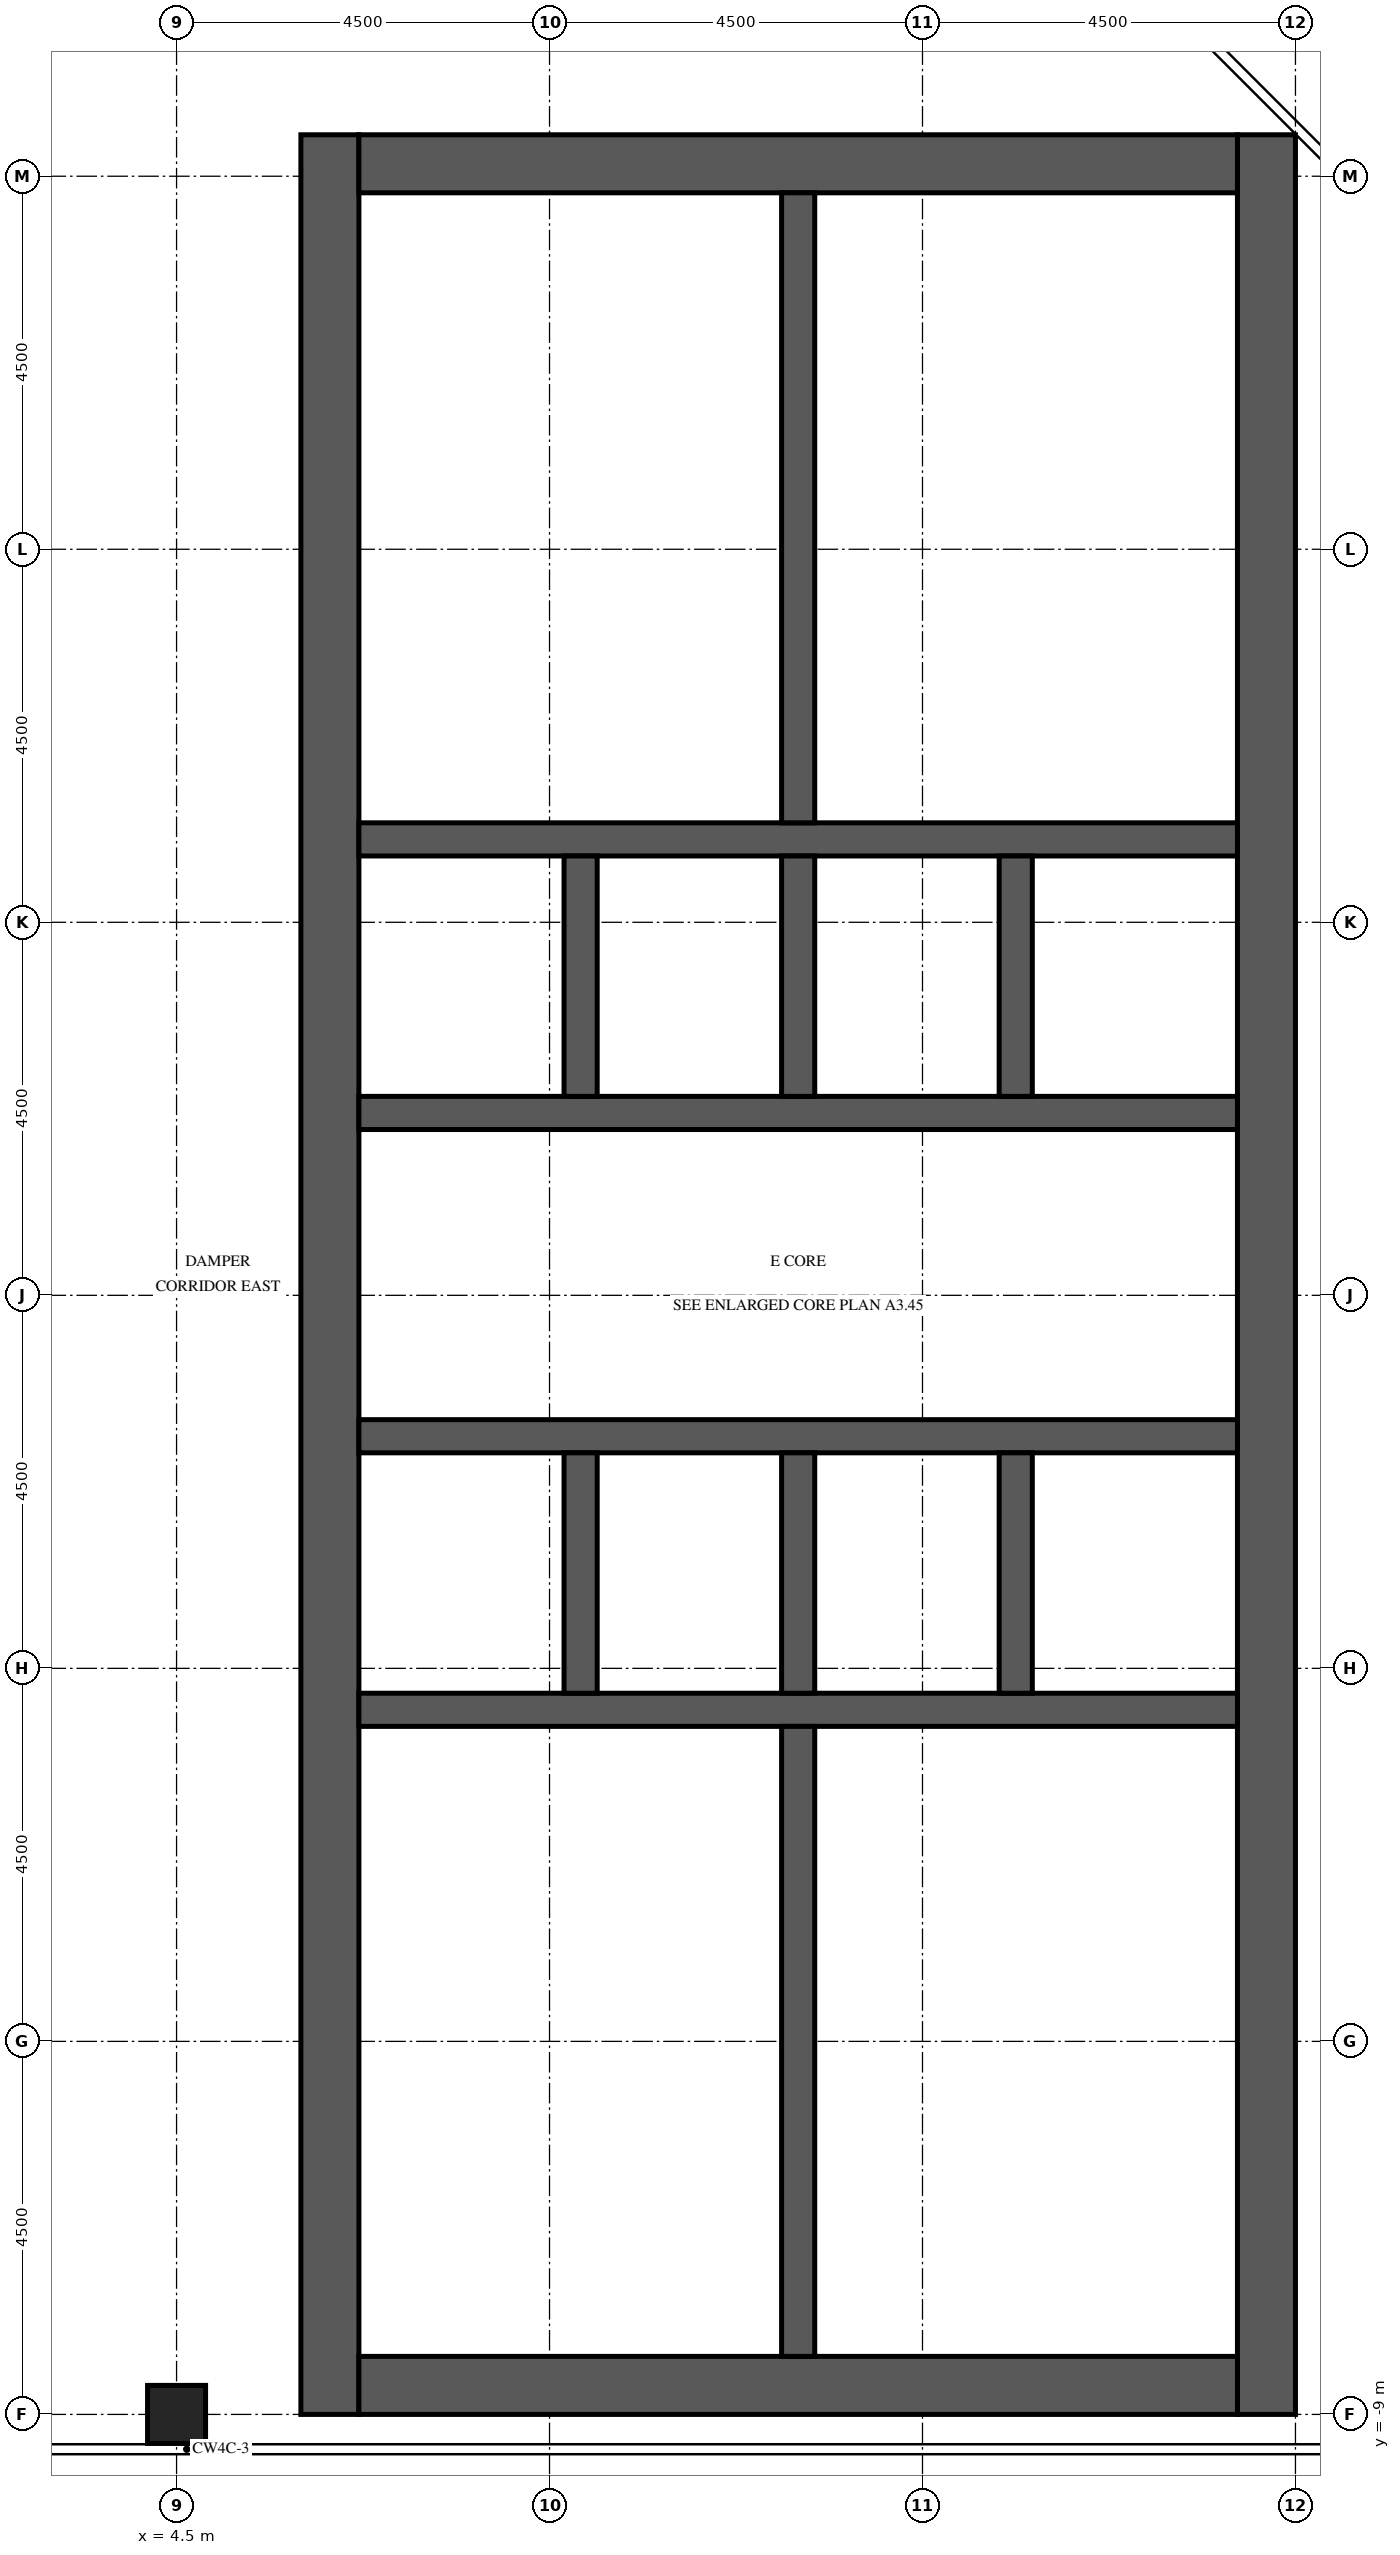
"""IFC4 building model, lengths in metres.
Left out: names, types, materials, properties, quantities, classifications, styles, units other than length and angle.
Written with IfcOpenShell. Run it as: python <this file> out.ifc"""

import sys

from ifc_helpers import new_model, si_unit, direction, frame, frame_2d, origin, origin_2d, place, context, subcontext, project, spatial, rectangle, extrude, element, fill, save


model = new_model("IFC4")
c1 = context("Model", 3, precision=1e-05, world=origin(), true_north=direction((0.0, 1.0)))
c2 = subcontext(c1, "Body", "Model", "MODEL_VIEW")
j1 = project(units=[si_unit("LENGTHUNIT", "METRE"), si_unit("PLANEANGLEUNIT", "RADIAN")], contexts=[c1])
p1 = place(None, origin())
s1 = spatial("IfcSite", under=j1, at=p1, CompositionType="ELEMENT")
p2 = place(p1, origin())
s2 = spatial("IfcBuilding", under=s1, at=p2, CompositionType="ELEMENT")
p3 = place(p2, frame((0.0, 0.0, 311.8)))
s3 = spatial("IfcBuildingStorey", under=s2, at=p3, CompositionType="ELEMENT", Elevation=311.8)
p4 = place(p3, frame((4.5, -9.0, -0.6), z_axis=(0.0, 0.0, 1.0), x_axis=(1.0, 0.0, 0.0)))
e1 = element("IfcColumn", 1, at=p4, inside=s3, PredefinedType="COLUMN", context=c2, shape_type="SweptSolid", body=[
    extrude(rectangle(XDim=0.7, YDim=0.7, at=origin_2d()), origin(), (0.0, 0.0, 1.0), 5.4),
])
p5 = place(p3, frame((6.35, -9.0, 0.0), z_axis=(0.0, 0.0, 1.0), x_axis=(0.0, 1.0, 0.0)))
e2 = element("IfcWall", 2, at=p5, inside=s3, PredefinedType="SHEAR", context=c2, shape_type="SweptSolid", body=[
    extrude(rectangle(XDim=27.5, YDim=0.7, at=frame_2d((13.75, 0.0))), origin(), (0.0, 0.0, 1.0), 4.8),
])
p6 = place(p5, frame((12.55, 0.0, 0.0)))
e3 = element("IfcOpeningElement", 3, at=p6, cuts=e2, PredefinedType="OPENING", context=c2, shape_type="SweptSolid", body=[
    extrude(rectangle(XDim=2.4, YDim=2.4, at=frame_2d((1.2, 1.2))), frame((0.0, 0.36, 0.0), z_axis=(0.0, -1.0, 0.0), x_axis=(1.0, 0.0, 0.0)), (0.0, 0.0, 1.0), 0.72),
])
p7 = place(p5, frame((3.9, 0.0, 0.0)))
e4 = element("IfcOpeningElement", 4, at=p7, cuts=e2, PredefinedType="OPENING", context=c2, shape_type="SweptSolid", body=[
    extrude(rectangle(XDim=1.2, YDim=2.1, at=frame_2d((0.6, 1.05))), frame((0.0, 0.36, 0.0), z_axis=(0.0, -1.0, 0.0), x_axis=(1.0, 0.0, 0.0)), (0.0, 0.0, 1.0), 0.72),
])
p8 = place(p5, frame((22.4, 0.0, 0.0)))
e5 = element("IfcOpeningElement", 5, at=p8, cuts=e2, PredefinedType="OPENING", context=c2, shape_type="SweptSolid", body=[
    extrude(rectangle(XDim=1.2, YDim=2.1, at=frame_2d((0.6, 1.05))), frame((0.0, 0.36, 0.0), z_axis=(0.0, -1.0, 0.0), x_axis=(1.0, 0.0, 0.0)), (0.0, 0.0, 1.0), 0.72),
])
p9 = place(p3, frame((17.65, -9.0, 0.0), z_axis=(0.0, 0.0, 1.0), x_axis=(0.0, 1.0, 0.0)))
e6 = element("IfcWall", 6, at=p9, inside=s3, PredefinedType="SHEAR", context=c2, shape_type="SweptSolid", body=[
    extrude(rectangle(XDim=27.5, YDim=0.7, at=frame_2d((13.75, 0.0))), origin(), (0.0, 0.0, 1.0), 4.8),
])
for number, where, z_axis, x_axis in (
    (7, (6.7, -8.65, 0.0), (0.0, 0.0, 1.0), (1.0, 0.0, 0.0)),
    (8, (6.7, 18.15, 0.0), (0.0, 0.0, 1.0), (1.0, 0.0, 0.0)),
):
    element("IfcWall", number, at=place(p3, frame(where, z_axis=z_axis, x_axis=x_axis)), inside=s3, PredefinedType="SHEAR", context=c2, shape_type="SweptSolid", body=[
        extrude(rectangle(XDim=10.6, YDim=0.7, at=frame_2d((5.3, 0.0))), origin(), (0.0, 0.0, 1.0), 4.8),
    ])
p10 = place(p3, frame((6.7, -0.5, 0.0), z_axis=(0.0, 0.0, 1.0), x_axis=(1.0, 0.0, 0.0)))
e9 = element("IfcWall", 9, at=p10, inside=s3, PredefinedType="SHEAR", context=c2, shape_type="SweptSolid", body=[
    extrude(rectangle(XDim=10.6, YDim=0.4, at=frame_2d((5.3, 0.0))), origin(), (0.0, 0.0, 1.0), 4.8),
])
p11 = place(p3, frame((6.7, 2.8, 0.0), z_axis=(0.0, 0.0, 1.0), x_axis=(1.0, 0.0, 0.0)))
e10 = element("IfcWall", 10, at=p11, inside=s3, PredefinedType="SHEAR", context=c2, shape_type="SweptSolid", body=[
    extrude(rectangle(XDim=10.6, YDim=0.4, at=frame_2d((5.3, 0.0))), origin(), (0.0, 0.0, 1.0), 4.8),
])
p12 = place(p11, frame((0.688, 0.0, 0.0)))
e11 = element("IfcOpeningElement", 11, at=p12, cuts=e10, PredefinedType="OPENING", context=c2, shape_type="SweptSolid", body=[
    extrude(rectangle(XDim=1.1, YDim=2.1, at=frame_2d((0.55, 1.05))), frame((0.0, 0.21, 0.0), z_axis=(0.0, -1.0, 0.0), x_axis=(1.0, 0.0, 0.0)), (0.0, 0.0, 1.0), 0.42),
])
p13 = place(p11, frame((3.438, 0.0, 0.0)))
e12 = element("IfcOpeningElement", 12, at=p13, cuts=e10, PredefinedType="OPENING", context=c2, shape_type="SweptSolid", body=[
    extrude(rectangle(XDim=1.1, YDim=2.1, at=frame_2d((0.55, 1.05))), frame((0.0, 0.21, 0.0), z_axis=(0.0, -1.0, 0.0), x_axis=(1.0, 0.0, 0.0)), (0.0, 0.0, 1.0), 0.42),
])
p14 = place(p11, frame((6.113, 0.0, 0.0)))
e13 = element("IfcOpeningElement", 13, at=p14, cuts=e10, PredefinedType="OPENING", context=c2, shape_type="SweptSolid", body=[
    extrude(rectangle(XDim=1.0, YDim=2.1, at=frame_2d((0.5, 1.05))), frame((0.0, 0.21, 0.0), z_axis=(0.0, -1.0, 0.0), x_axis=(1.0, 0.0, 0.0)), (0.0, 0.0, 1.0), 0.42),
])
p15 = place(p11, frame((8.863, 0.0, 0.0)))
e14 = element("IfcOpeningElement", 14, at=p15, cuts=e10, PredefinedType="OPENING", context=c2, shape_type="SweptSolid", body=[
    extrude(rectangle(XDim=1.0, YDim=2.1, at=frame_2d((0.5, 1.05))), frame((0.0, 0.21, 0.0), z_axis=(0.0, -1.0, 0.0), x_axis=(1.0, 0.0, 0.0)), (0.0, 0.0, 1.0), 0.42),
])
p16 = place(p3, frame((6.7, 6.7, 0.0), z_axis=(0.0, 0.0, 1.0), x_axis=(1.0, 0.0, 0.0)))
e15 = element("IfcWall", 15, at=p16, inside=s3, PredefinedType="SHEAR", context=c2, shape_type="SweptSolid", body=[
    extrude(rectangle(XDim=10.6, YDim=0.4, at=frame_2d((5.3, 0.0))), origin(), (0.0, 0.0, 1.0), 4.8),
])
p17 = place(p16, frame((0.738, 0.0, 0.0)))
e16 = element("IfcOpeningElement", 16, at=p17, cuts=e15, PredefinedType="OPENING", context=c2, shape_type="SweptSolid", body=[
    extrude(rectangle(XDim=1.0, YDim=2.1, at=frame_2d((0.5, 1.05))), frame((0.0, 0.21, 0.0), z_axis=(0.0, -1.0, 0.0), x_axis=(1.0, 0.0, 0.0)), (0.0, 0.0, 1.0), 0.42),
])
p18 = place(p16, frame((3.488, 0.0, 0.0)))
e17 = element("IfcOpeningElement", 17, at=p18, cuts=e15, PredefinedType="OPENING", context=c2, shape_type="SweptSolid", body=[
    extrude(rectangle(XDim=1.0, YDim=2.1, at=frame_2d((0.5, 1.05))), frame((0.0, 0.21, 0.0), z_axis=(0.0, -1.0, 0.0), x_axis=(1.0, 0.0, 0.0)), (0.0, 0.0, 1.0), 0.42),
])
p19 = place(p16, frame((6.113, 0.0, 0.0)))
e18 = element("IfcOpeningElement", 18, at=p19, cuts=e15, PredefinedType="OPENING", context=c2, shape_type="SweptSolid", body=[
    extrude(rectangle(XDim=1.0, YDim=2.1, at=frame_2d((0.5, 1.05))), frame((0.0, 0.21, 0.0), z_axis=(0.0, -1.0, 0.0), x_axis=(1.0, 0.0, 0.0)), (0.0, 0.0, 1.0), 0.42),
])
p20 = place(p16, frame((8.863, 0.0, 0.0)))
e19 = element("IfcOpeningElement", 19, at=p20, cuts=e15, PredefinedType="OPENING", context=c2, shape_type="SweptSolid", body=[
    extrude(rectangle(XDim=1.0, YDim=2.1, at=frame_2d((0.5, 1.05))), frame((0.0, 0.21, 0.0), z_axis=(0.0, -1.0, 0.0), x_axis=(1.0, 0.0, 0.0)), (0.0, 0.0, 1.0), 0.42),
])
p21 = place(p3, frame((6.7, 10.0, 0.0), z_axis=(0.0, 0.0, 1.0), x_axis=(1.0, 0.0, 0.0)))
e20 = element("IfcWall", 20, at=p21, inside=s3, PredefinedType="SHEAR", context=c2, shape_type="SweptSolid", body=[
    extrude(rectangle(XDim=10.6, YDim=0.4, at=frame_2d((5.3, 0.0))), origin(), (0.0, 0.0, 1.0), 4.8),
])
for number, where, z_axis, x_axis in (
    (21, (9.375, -0.3, 0.0), (0.0, 0.0, 1.0), (0.0, 1.0, 0.0)),
    (22, (9.375, 6.9, 0.0), (0.0, 0.0, 1.0), (0.0, 1.0, 0.0)),
    (23, (12.0, -0.3, 0.0), (0.0, 0.0, 1.0), (0.0, 1.0, 0.0)),
    (24, (12.0, 6.9, 0.0), (0.0, 0.0, 1.0), (0.0, 1.0, 0.0)),
    (25, (14.625, -0.3, 0.0), (0.0, 0.0, 1.0), (0.0, 1.0, 0.0)),
    (26, (14.625, 6.9, 0.0), (0.0, 0.0, 1.0), (0.0, 1.0, 0.0)),
):
    element("IfcWall", number, at=place(p3, frame(where, z_axis=z_axis, x_axis=x_axis)), inside=s3, PredefinedType="SHEAR", context=c2, shape_type="SweptSolid", body=[
        extrude(rectangle(XDim=2.9, YDim=0.4, at=frame_2d((1.45, 0.0))), origin(), (0.0, 0.0, 1.0), 4.8),
    ])
p22 = place(p3, frame((12.0, -8.3, 0.0), z_axis=(0.0, 0.0, 1.0), x_axis=(0.0, 1.0, 0.0)))
e27 = element("IfcWall", 27, at=p22, inside=s3, PredefinedType="SHEAR", context=c2, shape_type="SweptSolid", body=[
    extrude(rectangle(XDim=7.6, YDim=0.4, at=frame_2d((3.8, 0.0))), origin(), (0.0, 0.0, 1.0), 4.8),
])
p23 = place(p22, frame((6.125, 0.0, 0.0)))
e28 = element("IfcOpeningElement", 28, at=p23, cuts=e27, PredefinedType="OPENING", context=c2, shape_type="SweptSolid", body=[
    extrude(rectangle(XDim=1.2, YDim=2.1, at=frame_2d((0.6, 1.05))), frame((0.0, 0.21, 0.0), z_axis=(0.0, -1.0, 0.0), x_axis=(1.0, 0.0, 0.0)), (0.0, 0.0, 1.0), 0.42),
])
p24 = place(p3, frame((12.0, 10.2, 0.0), z_axis=(0.0, 0.0, 1.0), x_axis=(0.0, 1.0, 0.0)))
e29 = element("IfcWall", 29, at=p24, inside=s3, PredefinedType="SHEAR", context=c2, shape_type="SweptSolid", body=[
    extrude(rectangle(XDim=7.6, YDim=0.4, at=frame_2d((3.8, 0.0))), origin(), (0.0, 0.0, 1.0), 4.8),
])
p25 = place(p24, frame((0.275, 0.0, 0.0)))
e30 = element("IfcOpeningElement", 30, at=p25, cuts=e29, PredefinedType="OPENING", context=c2, shape_type="SweptSolid", body=[
    extrude(rectangle(XDim=1.2, YDim=2.1, at=frame_2d((0.6, 1.05))), frame((0.0, 0.21, 0.0), z_axis=(0.0, -1.0, 0.0), x_axis=(1.0, 0.0, 0.0)), (0.0, 0.0, 1.0), 0.42),
])
p26 = place(p12, origin())
e31 = element("IfcDoor", 31, at=p26, inside=s3, OperationType="DOUBLE_DOOR_SLIDING", PredefinedType="DOOR", context=c2, shape_type="SweptSolid", body=[
    extrude(rectangle(XDim=1.1, YDim=2.1, at=frame_2d((0.55, 1.05))), frame((0.0, 0.025, 0.0), z_axis=(0.0, -1.0, 0.0), x_axis=(1.0, 0.0, 0.0)), (0.0, 0.0, 1.0), 0.05),
])
fill(e11, e31)
p27 = place(p13, origin())
e32 = element("IfcDoor", 32, at=p27, inside=s3, OperationType="DOUBLE_DOOR_SLIDING", PredefinedType="DOOR", context=c2, shape_type="SweptSolid", body=[
    extrude(rectangle(XDim=1.1, YDim=2.1, at=frame_2d((0.55, 1.05))), frame((0.0, 0.025, 0.0), z_axis=(0.0, -1.0, 0.0), x_axis=(1.0, 0.0, 0.0)), (0.0, 0.0, 1.0), 0.05),
])
fill(e12, e32)
p28 = place(p6, origin())
e33 = element("IfcDoor", 33, at=p28, inside=s3, OperationType="DOUBLE_DOOR_DOUBLE_SWING", PredefinedType="DOOR", context=c2, shape_type="SweptSolid", body=[
    extrude(rectangle(XDim=2.4, YDim=2.4, at=frame_2d((1.2, 1.2))), frame((0.0, 0.025, 0.0), z_axis=(0.0, -1.0, 0.0), x_axis=(1.0, 0.0, 0.0)), (0.0, 0.0, 1.0), 0.05),
])
fill(e3, e33)
p29 = place(p23, origin())
e34 = element("IfcDoor", 34, at=p29, inside=s3, OperationType="SINGLE_SWING_RIGHT", PredefinedType="DOOR", context=c2, shape_type="SweptSolid", body=[
    extrude(rectangle(XDim=1.2, YDim=2.1, at=frame_2d((0.6, 1.05))), frame((0.0, 0.025, 0.0), z_axis=(0.0, -1.0, 0.0), x_axis=(1.0, 0.0, 0.0)), (0.0, 0.0, 1.0), 0.05),
])
fill(e28, e34)
p30 = place(p25, origin())
e35 = element("IfcDoor", 35, at=p30, inside=s3, OperationType="SINGLE_SWING_RIGHT", PredefinedType="DOOR", context=c2, shape_type="SweptSolid", body=[
    extrude(rectangle(XDim=1.2, YDim=2.1, at=frame_2d((0.6, 1.05))), frame((0.0, 0.025, 0.0), z_axis=(0.0, -1.0, 0.0), x_axis=(1.0, 0.0, 0.0)), (0.0, 0.0, 1.0), 0.05),
])
fill(e30, e35)
p31 = place(p14, origin())
e36 = element("IfcDoor", 36, at=p31, inside=s3, OperationType="SINGLE_SWING_LEFT", PredefinedType="DOOR", context=c2, shape_type="SweptSolid", body=[
    extrude(rectangle(XDim=1.0, YDim=2.1, at=frame_2d((0.5, 1.05))), frame((0.0, 0.025, 0.0), z_axis=(0.0, -1.0, 0.0), x_axis=(1.0, 0.0, 0.0)), (0.0, 0.0, 1.0), 0.05),
])
fill(e13, e36)
p32 = place(p15, origin())
e37 = element("IfcDoor", 37, at=p32, inside=s3, OperationType="SINGLE_SWING_RIGHT", PredefinedType="DOOR", context=c2, shape_type="SweptSolid", body=[
    extrude(rectangle(XDim=1.0, YDim=2.1, at=frame_2d((0.5, 1.05))), frame((0.0, 0.025, 0.0), z_axis=(0.0, -1.0, 0.0), x_axis=(1.0, 0.0, 0.0)), (0.0, 0.0, 1.0), 0.05),
])
fill(e14, e37)
p33 = place(p17, origin())
e38 = element("IfcDoor", 38, at=p33, inside=s3, OperationType="SINGLE_SWING_LEFT", PredefinedType="DOOR", context=c2, shape_type="SweptSolid", body=[
    extrude(rectangle(XDim=1.0, YDim=2.1, at=frame_2d((0.5, 1.05))), frame((0.0, 0.025, 0.0), z_axis=(0.0, -1.0, 0.0), x_axis=(1.0, 0.0, 0.0)), (0.0, 0.0, 1.0), 0.05),
])
fill(e16, e38)
p34 = place(p18, origin())
e39 = element("IfcDoor", 39, at=p34, inside=s3, OperationType="SINGLE_SWING_RIGHT", PredefinedType="DOOR", context=c2, shape_type="SweptSolid", body=[
    extrude(rectangle(XDim=1.0, YDim=2.1, at=frame_2d((0.5, 1.05))), frame((0.0, 0.025, 0.0), z_axis=(0.0, -1.0, 0.0), x_axis=(1.0, 0.0, 0.0)), (0.0, 0.0, 1.0), 0.05),
])
fill(e17, e39)
p35 = place(p19, origin())
e40 = element("IfcDoor", 40, at=p35, inside=s3, OperationType="SINGLE_SWING_LEFT", PredefinedType="DOOR", context=c2, shape_type="SweptSolid", body=[
    extrude(rectangle(XDim=1.0, YDim=2.1, at=frame_2d((0.5, 1.05))), frame((0.0, 0.025, 0.0), z_axis=(0.0, -1.0, 0.0), x_axis=(1.0, 0.0, 0.0)), (0.0, 0.0, 1.0), 0.05),
])
fill(e18, e40)
p36 = place(p20, origin())
e41 = element("IfcDoor", 41, at=p36, inside=s3, OperationType="SINGLE_SWING_RIGHT", PredefinedType="DOOR", context=c2, shape_type="SweptSolid", body=[
    extrude(rectangle(XDim=1.0, YDim=2.1, at=frame_2d((0.5, 1.05))), frame((0.0, 0.025, 0.0), z_axis=(0.0, -1.0, 0.0), x_axis=(1.0, 0.0, 0.0)), (0.0, 0.0, 1.0), 0.05),
])
fill(e19, e41)
p37 = place(p7, origin())
e42 = element("IfcDoor", 42, at=p37, inside=s3, OperationType="SINGLE_SWING_RIGHT", PredefinedType="DOOR", context=c2, shape_type="SweptSolid", body=[
    extrude(rectangle(XDim=1.2, YDim=2.1, at=frame_2d((0.6, 1.05))), frame((0.0, -0.275, 0.0), z_axis=(0.0, -1.0, 0.0), x_axis=(1.0, 0.0, 0.0)), (0.0, 0.0, 1.0), 0.05),
])
fill(e4, e42)
p38 = place(p8, origin())
e43 = element("IfcDoor", 43, at=p38, inside=s3, OperationType="SINGLE_SWING_RIGHT", PredefinedType="DOOR", context=c2, shape_type="SweptSolid", body=[
    extrude(rectangle(XDim=1.2, YDim=2.1, at=frame_2d((0.6, 1.05))), frame((0.0, -0.275, 0.0), z_axis=(0.0, -1.0, 0.0), x_axis=(1.0, 0.0, 0.0)), (0.0, 0.0, 1.0), 0.05),
])
fill(e5, e43)
save(model, sys.argv[1])
